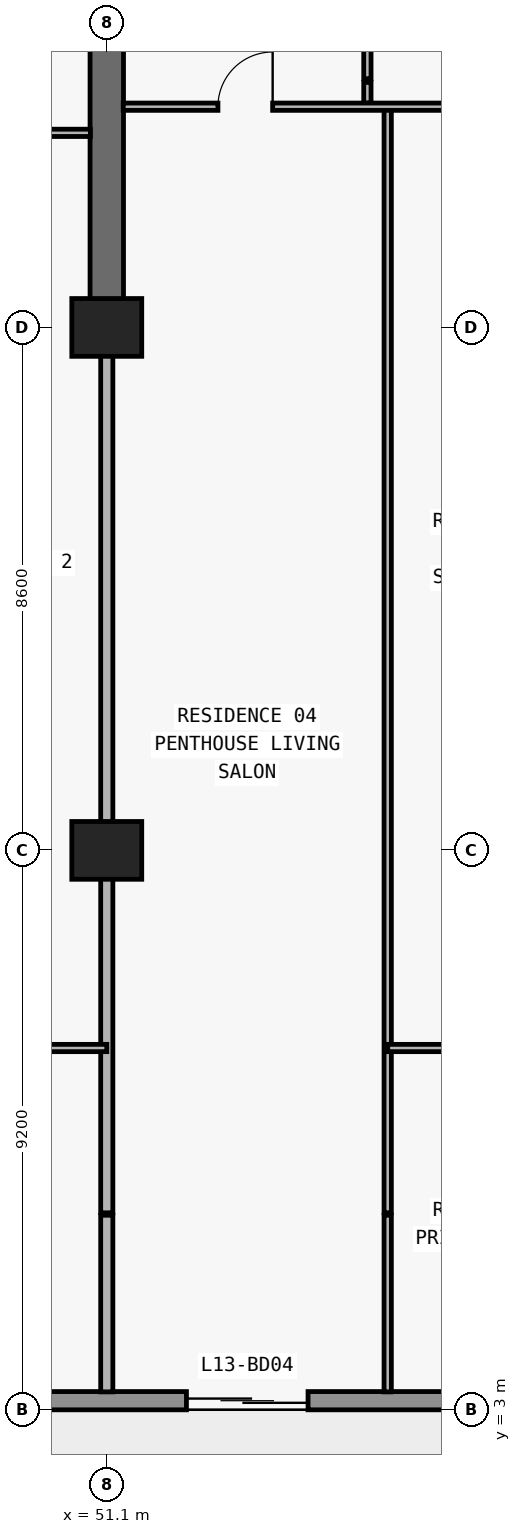
"""IFC4 building model, lengths in metres.
Left out: names, types, materials, properties, quantities, classifications, styles, units other than length and angle.
Written with IfcOpenShell. Run it as: python <this file> out.ifc"""

import sys

from ifc_helpers import new_model, si_unit, direction, frame, frame_2d, origin, origin_2d, place, context, subcontext, project, spatial, rectangle, extrude, element, fill, save


model = new_model("IFC4")
c1 = context("Model", 3, precision=1e-05, world=origin(), true_north=direction((0.0, 1.0)))
c2 = subcontext(c1, "Body", "Model", "MODEL_VIEW")
j1 = project(units=[si_unit("LENGTHUNIT", "METRE"), si_unit("PLANEANGLEUNIT", "RADIAN")], contexts=[c1])
p1 = place(None, origin())
s1 = spatial("IfcSite", under=j1, at=p1, CompositionType="ELEMENT")
p2 = place(p1, origin())
s2 = spatial("IfcBuilding", under=s1, at=p2, CompositionType="ELEMENT")
p3 = place(p2, frame((0.0, 0.0, 53.1)))
s3 = spatial("IfcBuildingStorey", under=s2, at=p3, CompositionType="ELEMENT", Elevation=53.1)
for number, where, z_axis, x_axis in (
    (1, (51.1, 12.2, 0.0), (0.0, 0.0, 1.0), (1.0, 0.0, 0.0)),
    (2, (51.1, 20.8, 0.0), (0.0, 0.0, 1.0), (1.0, 0.0, 0.0)),
):
    element("IfcColumn", number, at=place(p3, frame(where, z_axis=z_axis, x_axis=x_axis)), inside=s3, PredefinedType="COLUMN", context=c2, shape_type="SweptSolid", body=[
        extrude(rectangle(XDim=1.15, YDim=0.95, at=origin_2d()), origin(), (0.0, 0.0, 1.0), 3.05),
    ])
p4 = place(p3, frame((51.1, 20.8, 0.0), z_axis=(0.0, 0.0, 1.0), x_axis=(0.0, 1.0, 0.0)))
e3 = element("IfcWall", 3, at=p4, inside=s3, PredefinedType="SHEAR", context=c2, shape_type="SweptSolid", body=[
    extrude(rectangle(XDim=8.6, YDim=0.55, at=frame_2d((4.3, 0.0))), origin(), (0.0, 0.0, 1.0), 3.05),
])
p5 = place(p3, frame((72.7, 3.15, 0.0), z_axis=(0.0, 0.0, 1.0), x_axis=(-1.0, 0.0, 0.0)))
e4 = element("IfcWall", 4, at=p5, inside=s3, PredefinedType="STANDARD", context=c2, shape_type="SweptSolid", body=[
    extrude(rectangle(XDim=67.6, YDim=0.3, at=frame_2d((33.8, 0.0))), origin(), (0.0, 0.0, 1.0), 3.05),
])
p6 = place(p5, frame((59.826, 0.0, 0.0)))
e5 = element("IfcOpeningElement", 5, at=p6, cuts=e4, PredefinedType="OPENING", context=c2, shape_type="SweptSolid", body=[
    extrude(rectangle(XDim=2.0, YDim=2.3, at=frame_2d((1.0, 1.15))), frame((0.0, 0.16, 0.0), z_axis=(0.0, -1.0, 0.0), x_axis=(1.0, 0.0, 0.0)), (0.0, 0.0, 1.0), 0.32),
])
p7 = place(p5, frame((55.526, 0.0, 0.85)))
e6 = element("IfcOpeningElement", 6, at=p7, cuts=e4, PredefinedType="OPENING", context=c2, shape_type="SweptSolid", body=[
    extrude(rectangle(XDim=2.2, YDim=1.55, at=frame_2d((1.1, 0.775))), frame((0.0, 0.16, 0.0), z_axis=(0.0, -1.0, 0.0), x_axis=(1.0, 0.0, 0.0)), (0.0, 0.0, 1.0), 0.32),
])
p8 = place(p5, frame((51.09, 0.0, 0.0)))
e7 = element("IfcOpeningElement", 7, at=p8, cuts=e4, PredefinedType="OPENING", context=c2, shape_type="SweptSolid", body=[
    extrude(rectangle(XDim=2.0, YDim=2.3, at=frame_2d((1.0, 1.15))), frame((0.0, 0.16, 0.0), z_axis=(0.0, -1.0, 0.0), x_axis=(1.0, 0.0, 0.0)), (0.0, 0.0, 1.0), 0.32),
])
p9 = place(p5, frame((46.99, 0.0, 0.85)))
e8 = element("IfcOpeningElement", 8, at=p9, cuts=e4, PredefinedType="OPENING", context=c2, shape_type="SweptSolid", body=[
    extrude(rectangle(XDim=1.8, YDim=1.55, at=frame_2d((0.9, 0.775))), frame((0.0, 0.16, 0.0), z_axis=(0.0, -1.0, 0.0), x_axis=(1.0, 0.0, 0.0)), (0.0, 0.0, 1.0), 0.32),
])
p10 = place(p5, frame((43.09, 0.0, 0.0)))
e9 = element("IfcOpeningElement", 9, at=p10, cuts=e4, PredefinedType="OPENING", context=c2, shape_type="SweptSolid", body=[
    extrude(rectangle(XDim=2.0, YDim=2.3, at=frame_2d((1.0, 1.15))), frame((0.0, 0.16, 0.0), z_axis=(0.0, -1.0, 0.0), x_axis=(1.0, 0.0, 0.0)), (0.0, 0.0, 1.0), 0.32),
])
p11 = place(p5, frame((38.41, 0.0, 0.65)))
e10 = element("IfcOpeningElement", 10, at=p11, cuts=e4, PredefinedType="OPENING", context=c2, shape_type="SweptSolid", body=[
    extrude(rectangle(XDim=2.6, YDim=1.85, at=frame_2d((1.3, 0.925))), frame((0.0, 0.16, 0.0), z_axis=(0.0, -1.0, 0.0), x_axis=(1.0, 0.0, 0.0)), (0.0, 0.0, 1.0), 0.32),
])
p12 = place(p5, frame((32.7, 0.0, 0.85)))
e11 = element("IfcOpeningElement", 11, at=p12, cuts=e4, PredefinedType="OPENING", context=c2, shape_type="SweptSolid", body=[
    extrude(rectangle(XDim=2.2, YDim=1.55, at=frame_2d((1.1, 0.775))), frame((0.0, 0.16, 0.0), z_axis=(0.0, -1.0, 0.0), x_axis=(1.0, 0.0, 0.0)), (0.0, 0.0, 1.0), 0.32),
])
p13 = place(p5, frame((24.7, 0.0, 0.85)))
e12 = element("IfcOpeningElement", 12, at=p13, cuts=e4, PredefinedType="OPENING", context=c2, shape_type="SweptSolid", body=[
    extrude(rectangle(XDim=2.2, YDim=1.55, at=frame_2d((1.1, 0.775))), frame((0.0, 0.16, 0.0), z_axis=(0.0, -1.0, 0.0), x_axis=(1.0, 0.0, 0.0)), (0.0, 0.0, 1.0), 0.32),
])
p14 = place(p5, frame((18.29, 0.0, 0.0)))
e13 = element("IfcOpeningElement", 13, at=p14, cuts=e4, PredefinedType="OPENING", context=c2, shape_type="SweptSolid", body=[
    extrude(rectangle(XDim=2.0, YDim=2.3, at=frame_2d((1.0, 1.15))), frame((0.0, 0.16, 0.0), z_axis=(0.0, -1.0, 0.0), x_axis=(1.0, 0.0, 0.0)), (0.0, 0.0, 1.0), 0.32),
])
p15 = place(p5, frame((14.19, 0.0, 0.85)))
e14 = element("IfcOpeningElement", 14, at=p15, cuts=e4, PredefinedType="OPENING", context=c2, shape_type="SweptSolid", body=[
    extrude(rectangle(XDim=1.8, YDim=1.55, at=frame_2d((0.9, 0.775))), frame((0.0, 0.16, 0.0), z_axis=(0.0, -1.0, 0.0), x_axis=(1.0, 0.0, 0.0)), (0.0, 0.0, 1.0), 0.32),
])
p16 = place(p5, frame((10.226, 0.0, 0.0)))
e15 = element("IfcOpeningElement", 15, at=p16, cuts=e4, PredefinedType="OPENING", context=c2, shape_type="SweptSolid", body=[
    extrude(rectangle(XDim=2.0, YDim=2.3, at=frame_2d((1.0, 1.15))), frame((0.0, 0.16, 0.0), z_axis=(0.0, -1.0, 0.0), x_axis=(1.0, 0.0, 0.0)), (0.0, 0.0, 1.0), 0.32),
])
p17 = place(p5, frame((5.926, 0.0, 0.85)))
e16 = element("IfcOpeningElement", 16, at=p17, cuts=e4, PredefinedType="OPENING", context=c2, shape_type="SweptSolid", body=[
    extrude(rectangle(XDim=2.2, YDim=1.55, at=frame_2d((1.1, 0.775))), frame((0.0, 0.16, 0.0), z_axis=(0.0, -1.0, 0.0), x_axis=(1.0, 0.0, 0.0)), (0.0, 0.0, 1.0), 0.32),
])
p18 = place(p3, frame((51.1, 3.295, 0.0), z_axis=(0.0, 0.0, 1.0), x_axis=(0.0, 1.0, 0.0)))
e17 = element("IfcWall", 17, at=p18, inside=s3, PredefinedType="PARTITIONING", context=c2, shape_type="SweptSolid", body=[
    extrude(rectangle(XDim=2.905, YDim=0.2, at=frame_2d((1.453, 0.0))), origin(), (0.0, 0.0, 1.0), 3.05),
])
p19 = place(p3, frame((51.1, 6.24, 0.0), z_axis=(0.0, 0.0, 1.0), x_axis=(0.0, 1.0, 0.0)))
e18 = element("IfcWall", 18, at=p19, inside=s3, PredefinedType="PARTITIONING", context=c2, shape_type="SweptSolid", body=[
    extrude(rectangle(XDim=14.555, YDim=0.2, at=frame_2d((7.277, 0.0))), origin(), (0.0, 0.0, 1.0), 2.11),
])
p20 = place(p3, frame((55.386, 24.49, 0.0), z_axis=(0.0, 0.0, 1.0), x_axis=(0.0, 1.0, 0.0)))
e19 = element("IfcWall", 19, at=p20, inside=s3, PredefinedType="PARTITIONING", context=c2, shape_type="SweptSolid", body=[
    extrude(rectangle(XDim=0.34, YDim=0.12, at=frame_2d((0.17, 0.0))), origin(), (0.0, 0.0, 1.0), 2.423),
])
p21 = place(p3, frame((55.386, 24.89, 0.0), z_axis=(0.0, 0.0, 1.0), x_axis=(0.0, 1.0, 0.0)))
e20 = element("IfcWall", 20, at=p21, inside=s3, PredefinedType="PARTITIONING", context=c2, shape_type="SweptSolid", body=[
    extrude(rectangle(XDim=4.69, YDim=0.12, at=frame_2d((2.345, 0.0))), origin(), (0.0, 0.0, 1.0), 2.423),
])
p22 = place(p21, frame((1.895, 0.0, 0.0)))
e21 = element("IfcOpeningElement", 21, at=p22, cuts=e20, PredefinedType="OPENING", context=c2, shape_type="SweptSolid", body=[
    extrude(rectangle(XDim=0.9, YDim=2.15, at=frame_2d((0.45, 1.075))), frame((0.0, 0.07, 0.0), z_axis=(0.0, -1.0, 0.0), x_axis=(1.0, 0.0, 0.0)), (0.0, 0.0, 1.0), 0.14),
])
p23 = place(p3, frame((55.72, 3.295, 0.0), z_axis=(0.0, 0.0, 1.0), x_axis=(0.0, 1.0, 0.0)))
e22 = element("IfcWall", 22, at=p23, inside=s3, PredefinedType="PARTITIONING", context=c2, shape_type="SweptSolid", body=[
    extrude(rectangle(XDim=2.905, YDim=0.12, at=frame_2d((1.453, 0.0))), origin(), (0.0, 0.0, 1.0), 3.05),
])
p24 = place(p3, frame((55.72, 6.24, 0.0), z_axis=(0.0, 0.0, 1.0), x_axis=(0.0, 1.0, 0.0)))
e23 = element("IfcWall", 23, at=p24, inside=s3, PredefinedType="PARTITIONING", context=c2, shape_type="SweptSolid", body=[
    extrude(rectangle(XDim=18.19, YDim=0.12, at=frame_2d((9.095, 0.0))), origin(), (0.0, 0.0, 1.0), 3.05),
])
p25 = place(p3, frame((35.1, 8.95, 0.0), z_axis=(0.0, 0.0, 1.0), x_axis=(1.0, 0.0, 0.0)))
e24 = element("IfcWall", 24, at=p25, inside=s3, PredefinedType="PARTITIONING", context=c2, shape_type="SweptSolid", body=[
    extrude(rectangle(XDim=16.0, YDim=0.12, at=frame_2d((8.0, 0.0))), origin(), (0.0, 0.0, 1.0), 3.05),
])
p26 = place(p25, frame((3.35, 0.0, 0.0)))
e25 = element("IfcOpeningElement", 25, at=p26, cuts=e24, PredefinedType="OPENING", context=c2, shape_type="SweptSolid", body=[
    extrude(rectangle(XDim=0.9, YDim=2.15, at=frame_2d((0.45, 1.075))), frame((0.0, 0.07, 0.0), z_axis=(0.0, -1.0, 0.0), x_axis=(1.0, 0.0, 0.0)), (0.0, 0.0, 1.0), 0.14),
])
p27 = place(p25, frame((11.35, 0.0, 0.0)))
e26 = element("IfcOpeningElement", 26, at=p27, cuts=e24, PredefinedType="OPENING", context=c2, shape_type="SweptSolid", body=[
    extrude(rectangle(XDim=0.9, YDim=2.15, at=frame_2d((0.45, 1.075))), frame((0.0, 0.07, 0.0), z_axis=(0.0, -1.0, 0.0), x_axis=(1.0, 0.0, 0.0)), (0.0, 0.0, 1.0), 0.14),
])
p28 = place(p3, frame((55.72, 8.95, 0.0), z_axis=(0.0, 0.0, 1.0), x_axis=(1.0, 0.0, 0.0)))
e27 = element("IfcWall", 27, at=p28, inside=s3, PredefinedType="PARTITIONING", context=c2, shape_type="SweptSolid", body=[
    extrude(rectangle(XDim=3.78, YDim=0.12, at=frame_2d((1.89, 0.0))), origin(), (0.0, 0.0, 1.0), 3.05),
])
p29 = place(p28, frame((1.44, 0.0, 0.0)))
e28 = element("IfcOpeningElement", 28, at=p29, cuts=e27, PredefinedType="OPENING", context=c2, shape_type="SweptSolid", body=[
    extrude(rectangle(XDim=0.9, YDim=2.15, at=frame_2d((0.45, 1.075))), frame((0.0, 0.07, 0.0), z_axis=(0.0, -1.0, 0.0), x_axis=(1.0, 0.0, 0.0)), (0.0, 0.0, 1.0), 0.14),
])
p30 = place(p3, frame((42.7, 24.0, 0.0), z_axis=(0.0, 0.0, 1.0), x_axis=(1.0, 0.0, 0.0)))
e29 = element("IfcWall", 29, at=p30, inside=s3, PredefinedType="PARTITIONING", context=c2, shape_type="SweptSolid", body=[
    extrude(rectangle(XDim=8.13, YDim=0.12, at=frame_2d((4.065, 0.0))), origin(), (0.0, 0.0, 1.0), 3.05),
])
p31 = place(p30, frame((3.615, 0.0, 0.0)))
e30 = element("IfcOpeningElement", 30, at=p31, cuts=e29, PredefinedType="OPENING", context=c2, shape_type="SweptSolid", body=[
    extrude(rectangle(XDim=0.9, YDim=2.15, at=frame_2d((0.45, 1.075))), frame((0.0, 0.07, 0.0), z_axis=(0.0, -1.0, 0.0), x_axis=(1.0, 0.0, 0.0)), (0.0, 0.0, 1.0), 0.14),
])
p32 = place(p3, frame((51.37, 24.43, 0.0), z_axis=(0.0, 0.0, 1.0), x_axis=(1.0, 0.0, 0.0)))
e31 = element("IfcWall", 31, at=p32, inside=s3, PredefinedType="PARTITIONING", context=c2, shape_type="SweptSolid", body=[
    extrude(rectangle(XDim=8.13, YDim=0.12, at=frame_2d((4.065, 0.0))), origin(), (0.0, 0.0, 1.0), 3.05),
])
p33 = place(p32, frame((1.558, 0.0, 0.0)))
e32 = element("IfcOpeningElement", 32, at=p33, cuts=e31, PredefinedType="OPENING", context=c2, shape_type="SweptSolid", body=[
    extrude(rectangle(XDim=0.9, YDim=2.15, at=frame_2d((0.45, 1.075))), frame((0.0, 0.07, 0.0), z_axis=(0.0, -1.0, 0.0), x_axis=(1.0, 0.0, 0.0)), (0.0, 0.0, 1.0), 0.14),
])
p34 = place(p32, frame((5.79, 0.0, 0.0)))
e33 = element("IfcOpeningElement", 33, at=p34, cuts=e31, PredefinedType="OPENING", context=c2, shape_type="SweptSolid", body=[
    extrude(rectangle(XDim=0.9, YDim=2.15, at=frame_2d((0.45, 1.075))), frame((0.0, 0.07, 0.0), z_axis=(0.0, -1.0, 0.0), x_axis=(1.0, 0.0, 0.0)), (0.0, 0.0, 1.0), 0.14),
])
p35 = place(p14, origin())
e34 = element("IfcDoor", 34, at=p35, inside=s3, OperationType="DOUBLE_DOOR_SLIDING", PredefinedType="DOOR", context=c2, shape_type="SweptSolid", body=[
    extrude(rectangle(XDim=2.0, YDim=2.3, at=frame_2d((1.0, 1.15))), frame((0.0, 0.025, 0.0), z_axis=(0.0, -1.0, 0.0), x_axis=(1.0, 0.0, 0.0)), (0.0, 0.0, 1.0), 0.05),
])
fill(e13, e34)
p36 = place(p33, origin())
e35 = element("IfcDoor", 35, at=p36, inside=s3, OperationType="SINGLE_SWING_RIGHT", PredefinedType="DOOR", context=c2, shape_type="SweptSolid", body=[
    extrude(rectangle(XDim=0.9, YDim=2.15, at=frame_2d((0.45, 1.075))), frame((0.0, 0.025, 0.0), z_axis=(0.0, -1.0, 0.0), x_axis=(1.0, 0.0, 0.0)), (0.0, 0.0, 1.0), 0.05),
])
fill(e32, e35)
save(model, sys.argv[1])
